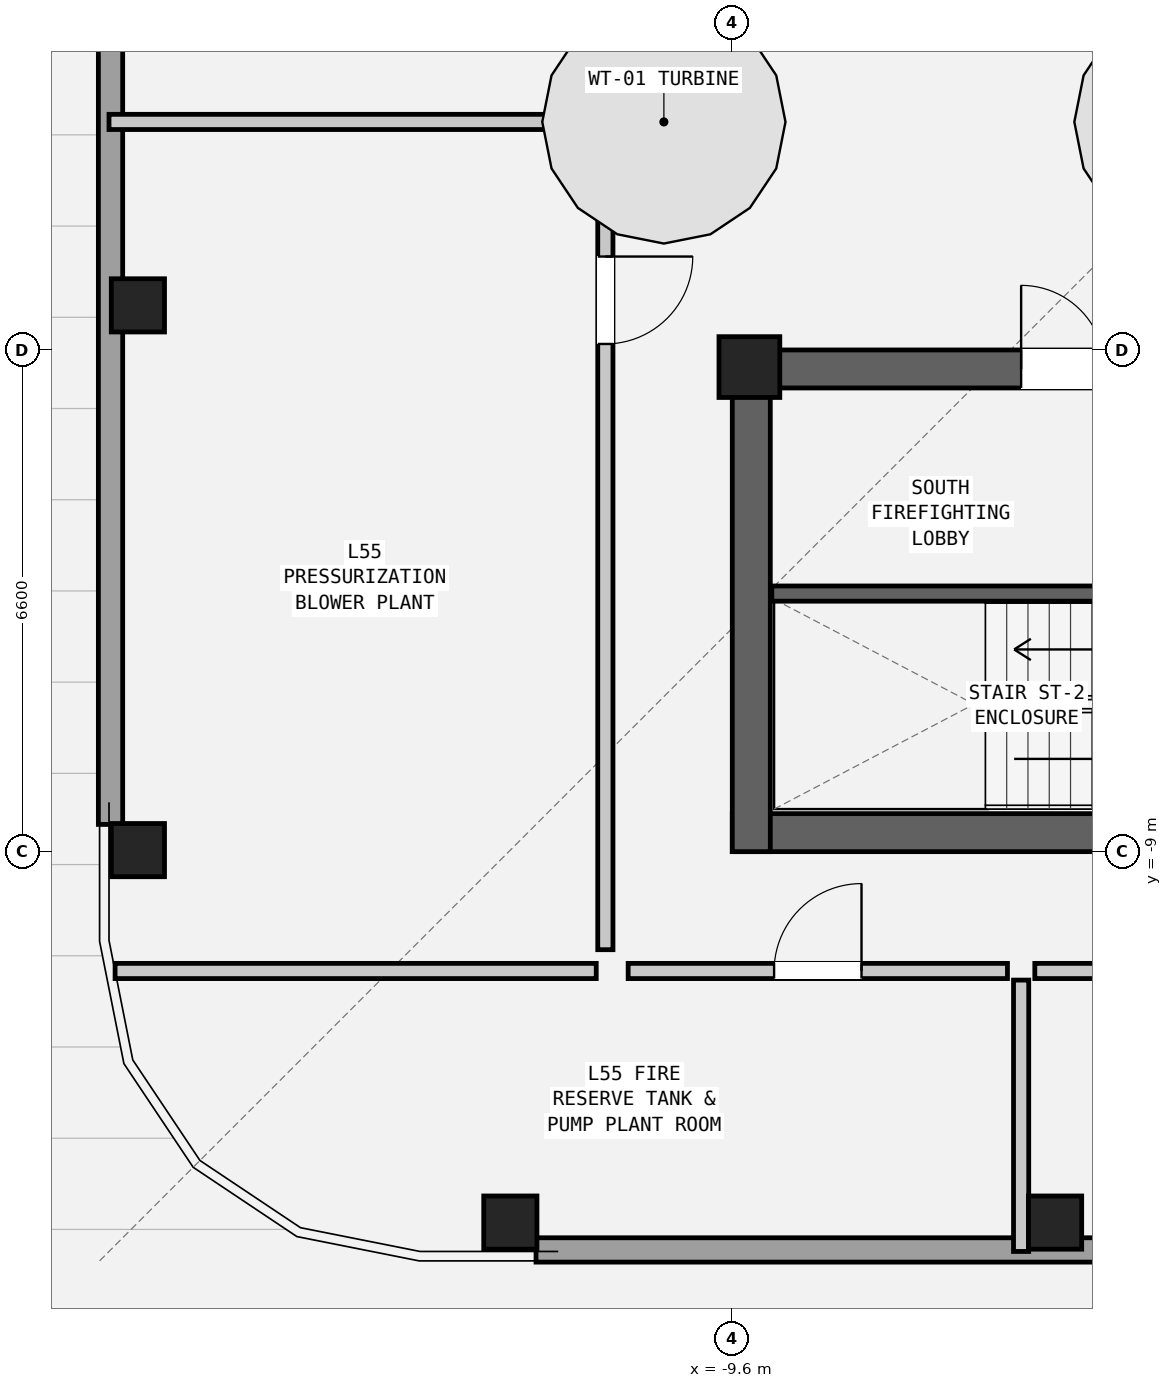
"""IFC4 building model, lengths in metres.
Left out: names, types, materials, properties, quantities, classifications, styles, units other than length and angle.
Written with IfcOpenShell. Run it as: python <this file> out.ifc"""

import sys

from ifc_helpers import new_model, si_unit, direction, frame, frame_2d, origin, origin_2d, place, context, subcontext, project, spatial, rectangle, hollow_rectangle, extrude, element, fill, save


model = new_model("IFC4")
c1 = context("Model", 3, precision=1e-05, world=origin(), true_north=direction((0.0, 1.0)))
c2 = subcontext(c1, "Body", "Model", "MODEL_VIEW")
j1 = project(units=[si_unit("LENGTHUNIT", "METRE"), si_unit("PLANEANGLEUNIT", "RADIAN")], contexts=[c1])
p1 = place(None, origin())
s1 = spatial("IfcSite", under=j1, at=p1, CompositionType="ELEMENT")
p2 = place(p1, origin())
s2 = spatial("IfcBuilding", under=s1, at=p2, CompositionType="ELEMENT")
p3 = place(p2, frame((0.0, 0.0, 187.95)))
s3 = spatial("IfcBuildingStorey", under=s2, at=p3, CompositionType="ELEMENT", Elevation=187.95)
p4 = place(p3, frame((-9.6, -8.75, 0.0), z_axis=(0.0, 0.0, 1.0), x_axis=(1.0, 0.0, 0.0)))
e1 = element("IfcWall", 1, at=p4, inside=s3, PredefinedType="SHEAR", context=c2, shape_type="SweptSolid", body=[
    extrude(rectangle(XDim=19.2, YDim=0.5, at=frame_2d((9.6, 0.0))), origin(), (0.0, 0.0, 1.0), 3.6),
])
p5 = place(p3, frame((-9.6, -2.65, 0.0), z_axis=(0.0, 0.0, 1.0), x_axis=(1.0, 0.0, 0.0)))
e2 = element("IfcWall", 2, at=p5, inside=s3, PredefinedType="SHEAR", context=c2, shape_type="SweptSolid", body=[
    extrude(rectangle(XDim=19.2, YDim=0.5, at=frame_2d((9.6, 0.0))), origin(), (0.0, 0.0, 1.0), 3.6),
])
p6 = place(p5, frame((3.8, 0.0, 0.0)))
e3 = element("IfcOpeningElement", 3, at=p6, cuts=e2, PredefinedType="OPENING", context=c2, shape_type="SweptSolid", body=[
    extrude(rectangle(XDim=1.1, YDim=2.08, at=frame_2d((0.55, 1.04))), frame((0.0, 0.262, 0.0), z_axis=(0.0, -1.0, 0.0), x_axis=(1.0, 0.0, 0.0)), (0.0, 0.0, 1.0), 0.524),
])
p7 = place(p5, frame((13.0, 0.0, 0.0)))
e4 = element("IfcOpeningElement", 4, at=p7, cuts=e2, PredefinedType="OPENING", context=c2, shape_type="SweptSolid", body=[
    extrude(rectangle(XDim=1.6, YDim=2.12, at=frame_2d((0.8, 1.06))), frame((0.0, 0.262, 0.0), z_axis=(0.0, -1.0, 0.0), x_axis=(1.0, 0.0, 0.0)), (0.0, 0.0, 1.0), 0.524),
])
p8 = place(p3, frame((-9.35, -9.0, 0.0), z_axis=(0.0, 0.0, 1.0), x_axis=(0.0, 1.0, 0.0)))
e5 = element("IfcWall", 5, at=p8, inside=s3, PredefinedType="SHEAR", context=c2, shape_type="SweptSolid", body=[
    extrude(rectangle(XDim=6.6, YDim=0.5, at=frame_2d((3.3, 0.0))), origin(), (0.0, 0.0, 1.0), 3.6),
])
for number, where, z_axis, x_axis in (
    (6, (-12.52, -13.88, 0.0), (0.0, 0.0, 1.0), (1.0, 0.0, 0.0)),
    (7, (-5.353, -13.88, 0.0), (0.0, 0.0, 1.0), (1.0, 0.0, 0.0)),
    (8, (-17.42, -1.813, 0.0), (0.0, 0.0, 1.0), (0.0, 1.0, 0.0)),
    (9, (-17.42, -8.98, 0.0), (0.0, 0.0, 1.0), (0.0, 1.0, 0.0)),
):
    element("IfcColumn", number, at=place(p3, frame(where, z_axis=z_axis, x_axis=x_axis)), inside=s3, PredefinedType="COLUMN", context=c2, shape_type="SweptSolid", body=[
        extrude(hollow_rectangle(XDim=0.7, YDim=0.7, WallThickness=0.045, at=origin_2d()), origin(), (0.0, 0.0, 1.0), 3.6),
    ])
p9 = place(p3, frame((-9.375, -2.625, 0.0), z_axis=(0.0, 0.0, 1.0), x_axis=(1.0, 0.0, 0.0)))
e10 = element("IfcColumn", 10, at=p9, inside=s3, PredefinedType="COLUMN", context=c2, shape_type="SweptSolid", body=[
    extrude(rectangle(XDim=0.8, YDim=0.8, at=origin_2d()), origin(), (0.0, 0.0, 1.0), 3.6),
])
p10 = place(p3, frame((8.642, -14.24, 0.0), z_axis=(0.0, 0.0, 1.0), x_axis=(-1.0, 0.0, 0.0)))
e11 = element("IfcWall", 11, at=p10, inside=s3, PredefinedType="SOLIDWALL", context=c2, shape_type="SweptSolid", body=[
    extrude(rectangle(XDim=20.824, YDim=0.32, at=frame_2d((10.412, 0.0))), origin(), (0.0, 0.0, 1.0), 2.182),
])
p11 = place(p10, frame((3.368, 0.0, 0.0)))
e12 = element("IfcOpeningElement", 12, at=p11, cuts=e11, PredefinedType="OPENING", context=c2, shape_type="SweptSolid", body=[
    extrude(rectangle(XDim=1.25, YDim=2.02, at=frame_2d((0.625, 1.01))), frame((0.0, 0.172, 0.0), z_axis=(0.0, -1.0, 0.0), x_axis=(1.0, 0.0, 0.0)), (0.0, 0.0, 1.0), 0.344),
])
p12 = place(p3, frame((-17.78, -8.642, 0.0), z_axis=(0.0, 0.0, 1.0), x_axis=(0.0, 1.0, 0.0)))
e13 = element("IfcWall", 13, at=p12, inside=s3, PredefinedType="SOLIDWALL", context=c2, shape_type="SweptSolid", body=[
    extrude(rectangle(XDim=20.824, YDim=0.32, at=frame_2d((10.412, 0.0))), origin(), (0.0, 0.0, 1.0), 2.182),
])
p13 = place(p3, frame((-9.08, -5.605, 0.0), z_axis=(0.0, 0.0, 1.0), x_axis=(1.0, 0.0, 0.0)))
e14 = element("IfcWall", 14, at=p13, inside=s3, PredefinedType="SHEAR", context=c2, shape_type="SweptSolid", body=[
    extrude(rectangle(XDim=6.72, YDim=0.2, at=frame_2d((3.36, 0.0))), origin(), (0.0, 0.0, 1.0), 3.32),
])
p14 = place(p13, frame((5.45, 0.0, 0.0)))
e15 = element("IfcOpeningElement", 15, at=p14, cuts=e14, PredefinedType="OPENING", context=c2, shape_type="SweptSolid", body=[
    extrude(rectangle(XDim=1.05, YDim=2.08, at=frame_2d((0.525, 1.04))), frame((0.0, 0.112, 0.0), z_axis=(0.0, -1.0, 0.0), x_axis=(1.0, 0.0, 0.0)), (0.0, 0.0, 1.0), 0.224),
])
p15 = place(p3, frame((-10.97, -10.57, 0.0), z_axis=(0.0, 0.0, 1.0), x_axis=(1.0, 0.0, 0.0)))
e16 = element("IfcWall", 16, at=p15, inside=s3, PredefinedType="PARTITIONING", context=c2, shape_type="SweptSolid", body=[
    extrude(rectangle(XDim=4.99, YDim=0.2, at=frame_2d((2.495, 0.0))), origin(), (0.0, 0.0, 1.0), 3.32),
])
p16 = place(p15, frame((1.92, 0.0, 0.0)))
e17 = element("IfcOpeningElement", 17, at=p16, cuts=e16, PredefinedType="OPENING", context=c2, shape_type="SweptSolid", body=[
    extrude(rectangle(XDim=1.15, YDim=2.1, at=frame_2d((0.575, 1.05))), frame((0.0, 0.112, 0.0), z_axis=(0.0, -1.0, 0.0), x_axis=(1.0, 0.0, 0.0)), (0.0, 0.0, 1.0), 0.224),
])
p17 = place(p3, frame((-5.8, -14.26, 0.0), z_axis=(0.0, 0.0, 1.0), x_axis=(0.0, 1.0, 0.0)))
e18 = element("IfcWall", 18, at=p17, inside=s3, PredefinedType="PARTITIONING", context=c2, shape_type="SweptSolid", body=[
    extrude(rectangle(XDim=3.57, YDim=0.2, at=frame_2d((1.785, 0.0))), origin(), (0.0, 0.0, 1.0), 2.538),
])
p18 = place(p3, frame((-5.62, -10.57, 0.0), z_axis=(0.0, 0.0, 1.0), x_axis=(1.0, 0.0, 0.0)))
e19 = element("IfcWall", 19, at=p18, inside=s3, PredefinedType="PARTITIONING", context=c2, shape_type="SweptSolid", body=[
    extrude(rectangle(XDim=5.09, YDim=0.2, at=frame_2d((2.545, 0.0))), origin(), (0.0, 0.0, 1.0), 3.32),
])
p19 = place(p18, frame((1.99, 0.0, 0.0)))
e20 = element("IfcOpeningElement", 20, at=p19, cuts=e19, PredefinedType="OPENING", context=c2, shape_type="SweptSolid", body=[
    extrude(rectangle(XDim=1.15, YDim=2.1, at=frame_2d((0.575, 1.05))), frame((0.0, 0.112, 0.0), z_axis=(0.0, -1.0, 0.0), x_axis=(1.0, 0.0, 0.0)), (0.0, 0.0, 1.0), 0.224),
])
p20 = place(p3, frame((-17.72, -10.57, 0.0), z_axis=(0.0, 0.0, 1.0), x_axis=(1.0, 0.0, 0.0)))
e21 = element("IfcWall", 21, at=p20, inside=s3, PredefinedType="PARTITIONING", context=c2, shape_type="SweptSolid", body=[
    extrude(rectangle(XDim=6.33, YDim=0.2, at=frame_2d((3.165, 0.0))), origin(), (0.0, 0.0, 1.0), 3.32),
])
p21 = place(p3, frame((-17.8, 0.6, 0.0), z_axis=(0.0, 0.0, 1.0), x_axis=(1.0, 0.0, 0.0)))
e22 = element("IfcWall", 22, at=p21, inside=s3, PredefinedType="PARTITIONING", context=c2, shape_type="SweptSolid", body=[
    extrude(rectangle(XDim=6.41, YDim=0.2, at=frame_2d((3.205, 0.0))), origin(), (0.0, 0.0, 1.0), 2.538),
])
p22 = place(p3, frame((-11.27, 0.39, 0.0), z_axis=(0.0, 0.0, 1.0), x_axis=(0.0, -1.0, 0.0)))
e23 = element("IfcWall", 23, at=p22, inside=s3, PredefinedType="PARTITIONING", context=c2, shape_type="SweptSolid", body=[
    extrude(rectangle(XDim=10.68, YDim=0.2, at=frame_2d((5.34, 0.0))), origin(), (0.0, 0.0, 1.0), 3.32),
])
p23 = place(p22, frame((1.561, 0.0, 0.0)))
e24 = element("IfcOpeningElement", 24, at=p23, cuts=e23, PredefinedType="OPENING", context=c2, shape_type="SweptSolid", body=[
    extrude(rectangle(XDim=1.15, YDim=2.1, at=frame_2d((0.575, 1.05))), frame((0.0, 0.112, 0.0), z_axis=(0.0, -1.0, 0.0), x_axis=(1.0, 0.0, 0.0)), (0.0, 0.0, 1.0), 0.224),
])
p24 = place(p3, frame((-11.27, 11.49, 0.0), z_axis=(0.0, 0.0, 1.0), x_axis=(0.0, -1.0, 0.0)))
e25 = element("IfcWall", 25, at=p24, inside=s3, PredefinedType="PARTITIONING", context=c2, shape_type="SweptSolid", body=[
    extrude(rectangle(XDim=10.68, YDim=0.2, at=frame_2d((5.34, 0.0))), origin(), (0.0, 0.0, 1.0), 3.32),
])
p25 = place(p24, frame((4.765, 0.0, 0.0)))
e26 = element("IfcOpeningElement", 26, at=p25, cuts=e25, PredefinedType="OPENING", context=c2, shape_type="SweptSolid", body=[
    extrude(rectangle(XDim=1.15, YDim=2.1, at=frame_2d((0.575, 1.05))), frame((0.0, 0.112, 0.0), z_axis=(0.0, -1.0, 0.0), x_axis=(1.0, 0.0, 0.0)), (0.0, 0.0, 1.0), 0.224),
])
p26 = place(p6, origin())
e27 = element("IfcDoor", 27, at=p26, inside=s3, OperationType="SINGLE_SWING_LEFT", PredefinedType="DOOR", context=c2, shape_type="SweptSolid", body=[
    extrude(rectangle(XDim=1.1, YDim=2.08, at=frame_2d((0.55, 1.04))), frame((0.0, 0.025, 0.0), z_axis=(0.0, -1.0, 0.0), x_axis=(1.0, 0.0, 0.0)), (0.0, 0.0, 1.0), 0.05),
])
fill(e3, e27)
p27 = place(p16, origin())
e28 = element("IfcDoor", 28, at=p27, inside=s3, OperationType="SINGLE_SWING_RIGHT", PredefinedType="DOOR", context=c2, shape_type="SweptSolid", body=[
    extrude(rectangle(XDim=1.15, YDim=2.1, at=frame_2d((0.575, 1.05))), frame((0.0, 0.025, 0.0), z_axis=(0.0, -1.0, 0.0), x_axis=(1.0, 0.0, 0.0)), (0.0, 0.0, 1.0), 0.05),
])
fill(e17, e28)
p28 = place(p23, origin())
e29 = element("IfcDoor", 29, at=p28, inside=s3, OperationType="SINGLE_SWING_LEFT", PredefinedType="DOOR", context=c2, shape_type="SweptSolid", body=[
    extrude(rectangle(XDim=1.15, YDim=2.1, at=frame_2d((0.575, 1.05))), frame((0.0, 0.025, 0.0), z_axis=(0.0, -1.0, 0.0), x_axis=(1.0, 0.0, 0.0)), (0.0, 0.0, 1.0), 0.05),
])
fill(e24, e29)
save(model, sys.argv[1])
